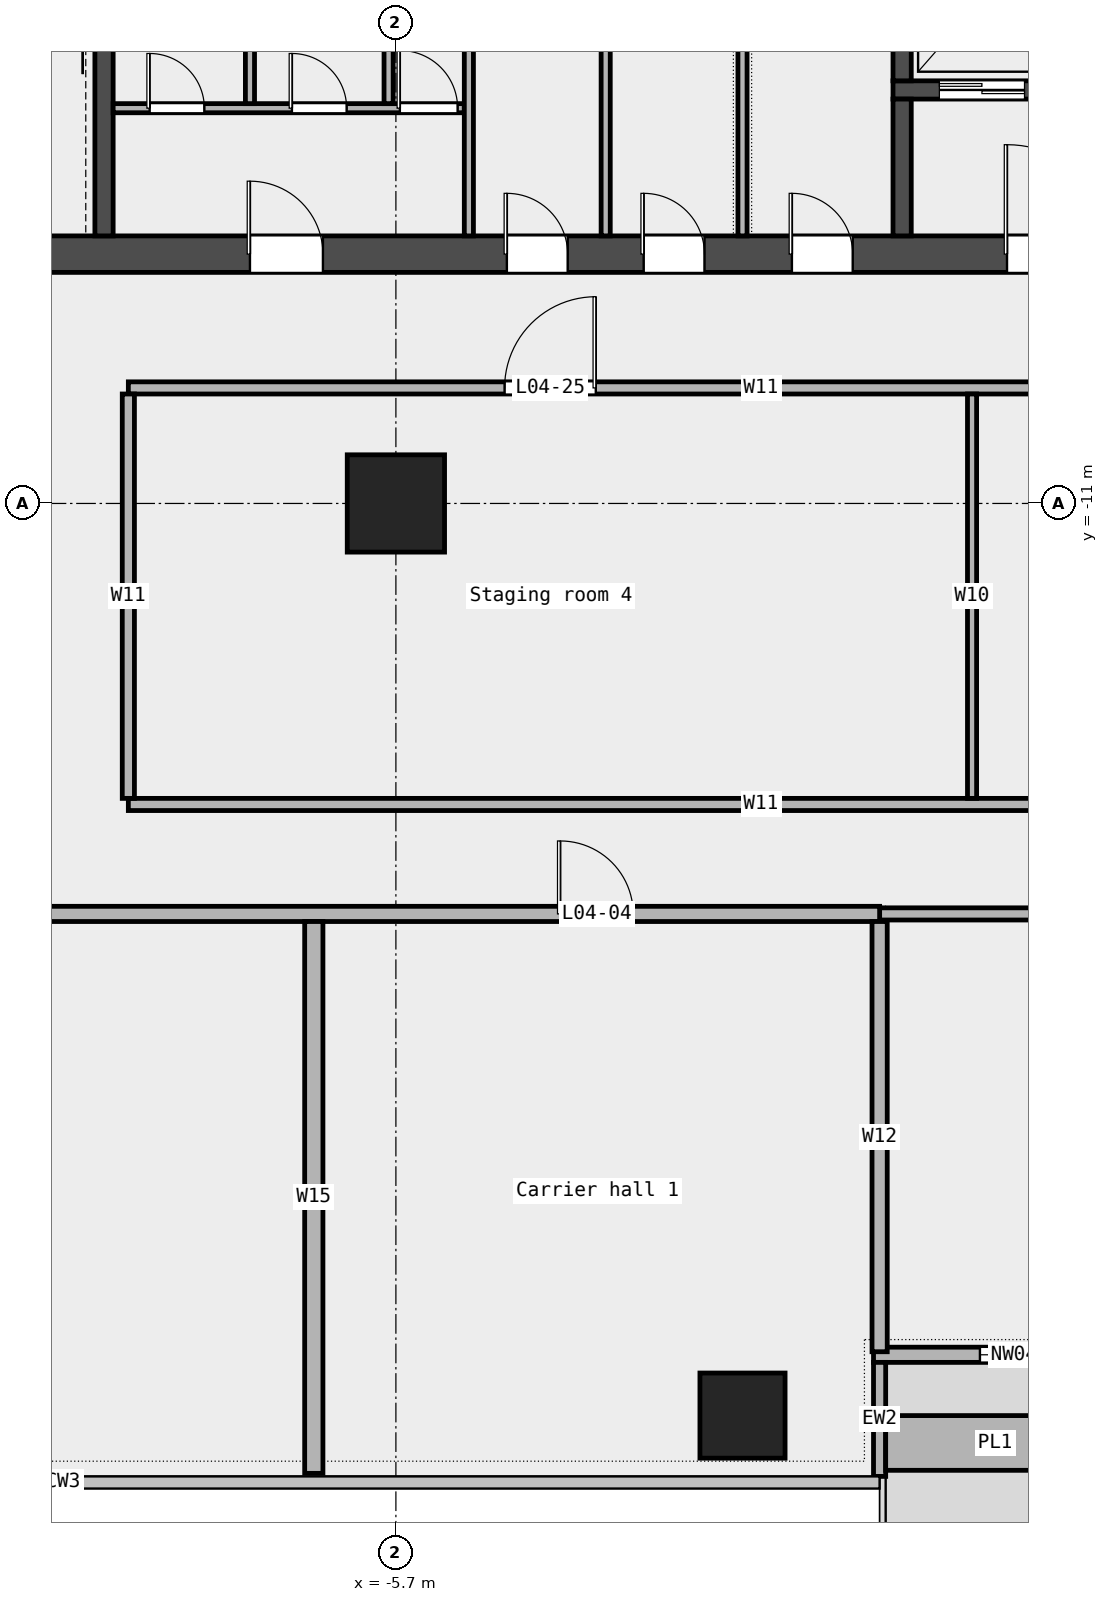
"""IFC4 building model, lengths in metres.
Left out: names, types, materials, properties, quantities, classifications, styles, units other than length and angle.
Written with IfcOpenShell. Run it as: python <this file> out.ifc"""

import sys

from ifc_helpers import new_model, si_unit, direction, frame, frame_2d, origin, origin_2d, place, context, subcontext, project, spatial, rectangle, extrude, element, fill, save


model = new_model("IFC4")
c1 = context("Model", 3, precision=1e-05, world=origin(), true_north=direction((0.0, 1.0)))
c2 = subcontext(c1, "Body", "Model", "MODEL_VIEW")
j1 = project(units=[si_unit("LENGTHUNIT", "METRE"), si_unit("PLANEANGLEUNIT", "RADIAN")], contexts=[c1])
p1 = place(None, origin())
s1 = spatial("IfcSite", under=j1, at=p1, CompositionType="ELEMENT")
p2 = place(p1, origin())
s2 = spatial("IfcBuilding", under=s1, at=p2, CompositionType="ELEMENT")
p3 = place(p2, frame((0.0, 0.0, 25.5)))
s3 = spatial("IfcBuildingStorey", under=s2, at=p3, CompositionType="ELEMENT", Elevation=25.5)
p4 = place(p3, frame((0.0, -26.0, 0.0), z_axis=(0.0, 0.0, 1.0), x_axis=(1.0, 0.0, 0.0)))
e1 = element("IfcColumn", 1, at=p4, inside=s3, PredefinedType="COLUMN", context=c2, shape_type="SweptSolid", body=[
    extrude(rectangle(XDim=1.4, YDim=1.4, at=origin_2d()), origin(), (0.0, 0.0, 1.0), 5.05),
])
p5 = place(p3, frame((-5.7, -11.0, 0.0), z_axis=(0.0, 0.0, 1.0), x_axis=(1.0, 0.0, 0.0)))
e2 = element("IfcColumn", 2, at=p5, inside=s3, PredefinedType="COLUMN", context=c2, shape_type="SweptSolid", body=[
    extrude(rectangle(XDim=1.6, YDim=1.6, at=origin_2d()), origin(), (0.0, 0.0, 1.0), 5.05),
])
p6 = place(p3, frame((2.155, -25.0, 0.0), z_axis=(0.0, 0.0, 1.0), x_axis=(1.0, 0.0, 0.0)))
e3 = element("IfcWall", 3, at=p6, inside=s3, PredefinedType="STANDARD", context=c2, shape_type="SweptSolid", body=[
    extrude(rectangle(XDim=13.727, YDim=0.25, at=frame_2d((6.864, 0.0))), origin(), (0.0, 0.0, 1.0), 5.05),
])
p7 = place(p6, frame((1.75, 0.0, 0.45)))
e4 = element("IfcOpeningElement", 4, at=p7, cuts=e3, PredefinedType="OPENING", context=c2, shape_type="SweptSolid", body=[
    extrude(rectangle(XDim=1.5, YDim=3.0, at=frame_2d((0.75, 1.5))), frame((0.0, 0.137, 0.0), z_axis=(0.0, -1.0, 0.0), x_axis=(1.0, 0.0, 0.0)), (0.0, 0.0, 1.0), 0.274),
])
p8 = place(p6, frame((6.0, 0.0, 0.0)))
e5 = element("IfcOpeningElement", 5, at=p8, cuts=e3, PredefinedType="OPENING", context=c2, shape_type="SweptSolid", body=[
    extrude(rectangle(XDim=1.8, YDim=2.4, at=frame_2d((0.9, 1.2))), frame((0.0, 0.137, 0.0), z_axis=(0.0, -1.0, 0.0), x_axis=(1.0, 0.0, 0.0)), (0.0, 0.0, 1.0), 0.274),
])
p9 = place(p6, frame((11.25, 0.0, 0.45)))
e6 = element("IfcOpeningElement", 6, at=p9, cuts=e3, PredefinedType="OPENING", context=c2, shape_type="SweptSolid", body=[
    extrude(rectangle(XDim=1.5, YDim=3.0, at=frame_2d((0.75, 1.5))), frame((0.0, 0.137, 0.0), z_axis=(0.0, -1.0, 0.0), x_axis=(1.0, 0.0, 0.0)), (0.0, 0.0, 1.0), 0.274),
])
p10 = place(p3, frame((2.255, -27.0, 0.0), z_axis=(0.0, 0.0, 1.0), x_axis=(0.0, 1.0, 0.0)))
e7 = element("IfcWall", 7, at=p10, inside=s3, PredefinedType="STANDARD", context=c2, shape_type="SweptSolid", body=[
    extrude(rectangle(XDim=1.875, YDim=0.2, at=frame_2d((0.938, 0.0))), origin(), (0.0, 0.0, 1.0), 5.05),
])
p11 = place(p3, frame((2.354, -26.45, 0.0), z_axis=(0.0, 0.0, 1.0), x_axis=(1.0, 0.0, 0.0)))
e8 = element("IfcWall", 8, at=p11, inside=s3, PredefinedType="STANDARD", context=c2, shape_type="SweptSolid", body=[
    extrude(rectangle(XDim=3.6, YDim=0.9, at=frame_2d((1.8, 0.0))), origin(), (0.0, 0.0, 1.0), 0.7),
])
p12 = place(p3, frame((2.255, -17.75, 0.0), z_axis=(0.0, 0.0, 1.0), x_axis=(1.0, 0.0, 0.0)))
e9 = element("IfcWall", 9, at=p12, inside=s3, PredefinedType="PARTITIONING", context=c2, shape_type="SweptSolid", body=[
    extrude(rectangle(XDim=13.525, YDim=0.2, at=frame_2d((6.763, 0.0))), origin(), (0.0, 0.0, 1.0), 5.05),
])
p13 = place(p12, frame((6.012, 0.0, 0.0)))
e10 = element("IfcOpeningElement", 10, at=p13, cuts=e9, PredefinedType="OPENING", context=c2, shape_type="SweptSolid", body=[
    extrude(rectangle(XDim=1.5, YDim=2.1, at=frame_2d((0.75, 1.05))), frame((0.0, 0.112, 0.0), z_axis=(0.0, -1.0, 0.0), x_axis=(1.0, 0.0, 0.0)), (0.0, 0.0, 1.0), 0.224),
])
p14 = place(p3, frame((-30.75, -17.75, 0.0), z_axis=(0.0, 0.0, 1.0), x_axis=(1.0, 0.0, 0.0)))
e11 = element("IfcWall", 11, at=p14, inside=s3, PredefinedType="PARTITIONING", context=c2, shape_type="SweptSolid", body=[
    extrude(rectangle(XDim=33.005, YDim=0.25, at=frame_2d((16.502, 0.0))), origin(), (0.0, 0.0, 1.0), 5.05),
])
p15 = place(p14, frame((27.752, 0.0, 0.0)))
e12 = element("IfcOpeningElement", 12, at=p15, cuts=e11, PredefinedType="OPENING", context=c2, shape_type="SweptSolid", body=[
    extrude(rectangle(XDim=1.2, YDim=2.1, at=frame_2d((0.6, 1.05))), frame((0.0, 0.137, 0.0), z_axis=(0.0, -1.0, 0.0), x_axis=(1.0, 0.0, 0.0)), (0.0, 0.0, 1.0), 0.274),
])
p16 = place(p14, frame((11.05, 0.0, 0.0)))
e13 = element("IfcOpeningElement", 13, at=p16, cuts=e11, PredefinedType="OPENING", context=c2, shape_type="SweptSolid", body=[
    extrude(rectangle(XDim=1.8, YDim=2.1, at=frame_2d((0.9, 1.05))), frame((0.0, 0.137, 0.0), z_axis=(0.0, -1.0, 0.0), x_axis=(1.0, 0.0, 0.0)), (0.0, 0.0, 1.0), 0.274),
])
p17 = place(p3, frame((-10.1, -15.95, 0.0), z_axis=(0.0, 0.0, 1.0), x_axis=(1.0, 0.0, 0.0)))
e14 = element("IfcWall", 14, at=p17, inside=s3, PredefinedType="PARTITIONING", context=c2, shape_type="SweptSolid", body=[
    extrude(rectangle(XDim=20.81, YDim=0.2, at=frame_2d((10.405, 0.0))), origin(), (0.0, 0.0, 1.0), 5.05),
])
p18 = place(p3, frame((-10.1, -9.1, 0.0), z_axis=(0.0, 0.0, 1.0), x_axis=(1.0, 0.0, 0.0)))
e15 = element("IfcWall", 15, at=p18, inside=s3, PredefinedType="PARTITIONING", context=c2, shape_type="SweptSolid", body=[
    extrude(rectangle(XDim=20.81, YDim=0.2, at=frame_2d((10.405, 0.0))), origin(), (0.0, 0.0, 1.0), 5.05),
])
p19 = place(p18, frame((16.742, 0.0, 0.0)))
e16 = element("IfcOpeningElement", 16, at=p19, cuts=e15, PredefinedType="OPENING", context=c2, shape_type="SweptSolid", body=[
    extrude(rectangle(XDim=1.2, YDim=2.1, at=frame_2d((0.6, 1.05))), frame((0.0, 0.112, 0.0), z_axis=(0.0, -1.0, 0.0), x_axis=(1.0, 0.0, 0.0)), (0.0, 0.0, 1.0), 0.224),
])
p20 = place(p18, frame((6.188, 0.0, 0.0)))
e17 = element("IfcOpeningElement", 17, at=p20, cuts=e15, PredefinedType="OPENING", context=c2, shape_type="SweptSolid", body=[
    extrude(rectangle(XDim=1.5, YDim=2.1, at=frame_2d((0.75, 1.05))), frame((0.0, 0.112, 0.0), z_axis=(0.0, -1.0, 0.0), x_axis=(1.0, 0.0, 0.0)), (0.0, 0.0, 1.0), 0.224),
])
p21 = place(p3, frame((-10.1, -15.85, 0.0), z_axis=(0.0, 0.0, 1.0), x_axis=(0.0, 1.0, 0.0)))
e18 = element("IfcWall", 18, at=p21, inside=s3, PredefinedType="PARTITIONING", context=c2, shape_type="SweptSolid", body=[
    extrude(rectangle(XDim=6.65, YDim=0.2, at=frame_2d((3.325, 0.0))), origin(), (0.0, 0.0, 1.0), 5.05),
])
p22 = place(p3, frame((-7.05, -26.95, 0.0), z_axis=(0.0, 0.0, 1.0), x_axis=(0.0, 1.0, 0.0)))
e19 = element("IfcWall", 19, at=p22, inside=s3, PredefinedType="PARTITIONING", context=c2, shape_type="SweptSolid", body=[
    extrude(rectangle(XDim=9.075, YDim=0.3, at=frame_2d((4.538, 0.0))), origin(), (0.0, 0.0, 1.0), 5.05),
])
p23 = place(p3, frame((2.255, -24.95, 0.0), z_axis=(0.0, 0.0, 1.0), x_axis=(0.0, 1.0, 0.0)))
e20 = element("IfcWall", 20, at=p23, inside=s3, PredefinedType="PARTITIONING", context=c2, shape_type="SweptSolid", body=[
    extrude(rectangle(XDim=7.075, YDim=0.25, at=frame_2d((3.538, 0.0))), origin(), (0.0, 0.0, 1.0), 5.05),
])
p24 = place(p3, frame((3.775, -15.85, 0.0), z_axis=(0.0, 0.0, 1.0), x_axis=(0.0, 1.0, 0.0)))
e21 = element("IfcWall", 21, at=p24, inside=s3, PredefinedType="PARTITIONING", context=c2, shape_type="SweptSolid", body=[
    extrude(rectangle(XDim=6.65, YDim=0.15, at=frame_2d((3.325, 0.0))), origin(), (0.0, 0.0, 1.0), 5.05),
])
p25 = place(p3, frame((-14.4, -6.9, 0.0), z_axis=(0.0, 0.0, 1.0), x_axis=(1.0, 0.0, 0.0)))
e22 = element("IfcWall", 22, at=p25, inside=s3, PredefinedType="SHEAR", context=c2, shape_type="SweptSolid", body=[
    extrude(rectangle(XDim=28.8, YDim=0.6, at=frame_2d((14.4, 0.0))), origin(), (0.0, 0.0, 1.0), 5.2),
])
p26 = place(p25, frame((6.3, 0.0, 0.0)))
e23 = element("IfcOpeningElement", 23, at=p26, cuts=e22, PredefinedType="OPENING", context=c2, shape_type="SweptSolid", body=[
    extrude(rectangle(XDim=1.2, YDim=2.1, at=frame_2d((0.6, 1.05))), frame((0.0, 0.312, 0.0), z_axis=(0.0, -1.0, 0.0), x_axis=(1.0, 0.0, 0.0)), (0.0, 0.0, 1.0), 0.624),
])
p27 = place(p25, frame((10.525, 0.0, 0.0)))
e24 = element("IfcOpeningElement", 24, at=p27, cuts=e22, PredefinedType="OPENING", context=c2, shape_type="SweptSolid", body=[
    extrude(rectangle(XDim=1.0, YDim=2.1, at=frame_2d((0.5, 1.05))), frame((0.0, 0.312, 0.0), z_axis=(0.0, -1.0, 0.0), x_axis=(1.0, 0.0, 0.0)), (0.0, 0.0, 1.0), 0.624),
])
p28 = place(p25, frame((12.775, 0.0, 0.0)))
e25 = element("IfcOpeningElement", 25, at=p28, cuts=e22, PredefinedType="OPENING", context=c2, shape_type="SweptSolid", body=[
    extrude(rectangle(XDim=1.0, YDim=2.1, at=frame_2d((0.5, 1.05))), frame((0.0, 0.312, 0.0), z_axis=(0.0, -1.0, 0.0), x_axis=(1.0, 0.0, 0.0)), (0.0, 0.0, 1.0), 0.624),
])
p29 = place(p25, frame((15.212, 0.0, 0.0)))
e26 = element("IfcOpeningElement", 26, at=p29, cuts=e22, PredefinedType="OPENING", context=c2, shape_type="SweptSolid", body=[
    extrude(rectangle(XDim=1.0, YDim=2.1, at=frame_2d((0.5, 1.05))), frame((0.0, 0.312, 0.0), z_axis=(0.0, -1.0, 0.0), x_axis=(1.0, 0.0, 0.0)), (0.0, 0.0, 1.0), 0.624),
])
p30 = place(p25, frame((18.75, 0.0, 0.0)))
e27 = element("IfcOpeningElement", 27, at=p30, cuts=e22, PredefinedType="OPENING", context=c2, shape_type="SweptSolid", body=[
    extrude(rectangle(XDim=1.8, YDim=2.1, at=frame_2d((0.9, 1.05))), frame((0.0, 0.312, 0.0), z_axis=(0.0, -1.0, 0.0), x_axis=(1.0, 0.0, 0.0)), (0.0, 0.0, 1.0), 0.624),
])
p31 = place(p25, frame((23.087, 0.0, 0.0)))
e28 = element("IfcOpeningElement", 28, at=p31, cuts=e22, PredefinedType="OPENING", context=c2, shape_type="SweptSolid", body=[
    extrude(rectangle(XDim=1.0, YDim=2.1, at=frame_2d((0.5, 1.05))), frame((0.0, 0.312, 0.0), z_axis=(0.0, -1.0, 0.0), x_axis=(1.0, 0.0, 0.0)), (0.0, 0.0, 1.0), 0.624),
])
p32 = place(p3, frame((-10.5, -6.6, 0.0), z_axis=(0.0, 0.0, 1.0), x_axis=(0.0, 1.0, 0.0)))
e29 = element("IfcWall", 29, at=p32, inside=s3, PredefinedType="SHEAR", context=c2, shape_type="SweptSolid", body=[
    extrude(rectangle(XDim=8.55, YDim=0.3, at=frame_2d((4.275, 0.0))), origin(), (0.0, 0.0, 1.0), 5.2),
])
p33 = place(p3, frame((2.475, -4.2, 0.0), z_axis=(0.0, 0.0, 1.0), x_axis=(1.0, 0.0, 0.0)))
e30 = element("IfcWall", 30, at=p33, inside=s3, PredefinedType="SOLIDWALL", context=c2, shape_type="SweptSolid", body=[
    extrude(rectangle(XDim=5.55, YDim=0.3, at=frame_2d((2.775, 0.0))), origin(), (0.0, 0.0, 1.0), 5.2),
])
p34 = place(p33, frame((0.762, 0.0, 0.0)))
e31 = element("IfcOpeningElement", 31, at=p34, cuts=e30, PredefinedType="OPENING", context=c2, shape_type="SweptSolid", body=[
    extrude(rectangle(XDim=1.4, YDim=2.1, at=frame_2d((0.7, 1.05))), frame((0.0, 0.162, 0.0), z_axis=(0.0, -1.0, 0.0), x_axis=(1.0, 0.0, 0.0)), (0.0, 0.0, 1.0), 0.324),
])
p35 = place(p33, frame((3.387, 0.0, 0.0)))
e32 = element("IfcOpeningElement", 32, at=p35, cuts=e30, PredefinedType="OPENING", context=c2, shape_type="SweptSolid", body=[
    extrude(rectangle(XDim=1.4, YDim=2.1, at=frame_2d((0.7, 1.05))), frame((0.0, 0.162, 0.0), z_axis=(0.0, -1.0, 0.0), x_axis=(1.0, 0.0, 0.0)), (0.0, 0.0, 1.0), 0.324),
])
p36 = place(p3, frame((2.625, -4.05, 0.0), z_axis=(0.0, 0.0, 1.0), x_axis=(0.0, 1.0, 0.0)))
e33 = element("IfcWall", 33, at=p36, inside=s3, PredefinedType="SOLIDWALL", context=c2, shape_type="SweptSolid", body=[
    extrude(rectangle(XDim=2.7, YDim=0.3, at=frame_2d((1.35, 0.0))), origin(), (0.0, 0.0, 1.0), 5.2),
])
p37 = place(p3, frame((2.625, -6.6, 0.0), z_axis=(0.0, 0.0, 1.0), x_axis=(0.0, 1.0, 0.0)))
e34 = element("IfcWall", 34, at=p37, inside=s3, PredefinedType="SOLIDWALL", context=c2, shape_type="SweptSolid", body=[
    extrude(rectangle(XDim=2.25, YDim=0.3, at=frame_2d((1.125, 0.0))), origin(), (0.0, 0.0, 1.0), 5.2),
])
p38 = place(p3, frame((-10.35, -4.5, 0.0), z_axis=(0.0, 0.0, 1.0), x_axis=(1.0, 0.0, 0.0)))
e35 = element("IfcWall", 35, at=p38, inside=s3, PredefinedType="PARTITIONING", context=c2, shape_type="SweptSolid", body=[
    extrude(rectangle(XDim=5.775, YDim=0.15, at=frame_2d((2.888, 0.0))), origin(), (0.0, 0.0, 1.0), 5.2),
])
p39 = place(p38, frame((0.6, 0.0, 0.0)))
e36 = element("IfcOpeningElement", 36, at=p39, cuts=e35, PredefinedType="OPENING", context=c2, shape_type="SweptSolid", body=[
    extrude(rectangle(XDim=0.9, YDim=2.1, at=frame_2d((0.45, 1.05))), frame((0.0, 0.087, 0.0), z_axis=(0.0, -1.0, 0.0), x_axis=(1.0, 0.0, 0.0)), (0.0, 0.0, 1.0), 0.174),
])
p40 = place(p38, frame((2.94, 0.0, 0.0)))
e37 = element("IfcOpeningElement", 37, at=p40, cuts=e35, PredefinedType="OPENING", context=c2, shape_type="SweptSolid", body=[
    extrude(rectangle(XDim=0.9, YDim=2.1, at=frame_2d((0.45, 1.05))), frame((0.0, 0.087, 0.0), z_axis=(0.0, -1.0, 0.0), x_axis=(1.0, 0.0, 0.0)), (0.0, 0.0, 1.0), 0.174),
])
p41 = place(p38, frame((4.715, 0.0, 0.0)))
e38 = element("IfcOpeningElement", 38, at=p41, cuts=e35, PredefinedType="OPENING", context=c2, shape_type="SweptSolid", body=[
    extrude(rectangle(XDim=0.95, YDim=2.1, at=frame_2d((0.475, 1.05))), frame((0.0, 0.087, 0.0), z_axis=(0.0, -1.0, 0.0), x_axis=(1.0, 0.0, 0.0)), (0.0, 0.0, 1.0), 0.174),
])
for number, where, z_axis, x_axis in (
    (39, (-8.1, -4.425, 0.0), (0.0, 0.0, 1.0), (0.0, 1.0, 0.0)),
    (40, (-5.82, -4.425, 0.0), (0.0, 0.0, 1.0), (0.0, 1.0, 0.0)),
):
    element("IfcWall", number, at=place(p3, frame(where, z_axis=z_axis, x_axis=x_axis)), inside=s3, PredefinedType="PARTITIONING", context=c2, shape_type="SweptSolid", body=[
        extrude(rectangle(XDim=3.075, YDim=0.15, at=frame_2d((1.538, 0.0))), origin(), (0.0, 0.0, 1.0), 5.2),
    ])
for number, where, z_axis, x_axis in (
    (41, (-4.5, -6.6, 0.0), (0.0, 0.0, 1.0), (0.0, 1.0, 0.0)),
    (42, (-2.25, -6.6, 0.0), (0.0, 0.0, 1.0), (0.0, 1.0, 0.0)),
    (43, (0.0, -6.6, 0.0), (0.0, 0.0, 1.0), (0.0, 1.0, 0.0)),
):
    element("IfcWall", number, at=place(p3, frame(where, z_axis=z_axis, x_axis=x_axis)), inside=s3, PredefinedType="PARTITIONING", context=c2, shape_type="SweptSolid", body=[
        extrude(rectangle(XDim=5.25, YDim=0.15, at=frame_2d((2.625, 0.0))), origin(), (0.0, 0.0, 1.0), 5.2),
    ])
p42 = place(p7, origin())
e44 = element("IfcWindow", 44, at=p42, inside=s3, PartitioningType="SINGLE_PANEL", PredefinedType="WINDOW", context=c2, shape_type="SweptSolid", body=[
    extrude(rectangle(XDim=1.5, YDim=3.0, at=frame_2d((0.75, 1.5))), frame((0.0, 0.03, 0.0), z_axis=(0.0, -1.0, 0.0), x_axis=(1.0, 0.0, 0.0)), (0.0, 0.0, 1.0), 0.06),
])
fill(e4, e44)
p43 = place(p15, origin())
e45 = element("IfcDoor", 45, at=p43, inside=s3, OperationType="SINGLE_SWING_LEFT", PredefinedType="DOOR", context=c2, shape_type="SweptSolid", body=[
    extrude(rectangle(XDim=1.2, YDim=2.1, at=frame_2d((0.6, 1.05))), frame((0.0, 0.025, 0.0), z_axis=(0.0, -1.0, 0.0), x_axis=(1.0, 0.0, 0.0)), (0.0, 0.0, 1.0), 0.05),
])
fill(e12, e45)
p44 = place(p20, origin())
e46 = element("IfcDoor", 46, at=p44, inside=s3, OperationType="DOUBLE_DOOR_SINGLE_SWING", PredefinedType="DOOR", context=c2, shape_type="SweptSolid", body=[
    extrude(rectangle(XDim=1.5, YDim=2.1, at=frame_2d((0.75, 1.05))), frame((0.0, 0.025, 0.0), z_axis=(0.0, -1.0, 0.0), x_axis=(1.0, 0.0, 0.0)), (0.0, 0.0, 1.0), 0.05),
])
fill(e17, e46)
p45 = place(p34, origin())
e47 = element("IfcDoor", 47, at=p45, inside=s3, OperationType="DOUBLE_DOOR_SLIDING", PredefinedType="DOOR", context=c2, shape_type="SweptSolid", body=[
    extrude(rectangle(XDim=1.4, YDim=2.1, at=frame_2d((0.7, 1.05))), frame((0.0, 0.025, 0.0), z_axis=(0.0, -1.0, 0.0), x_axis=(1.0, 0.0, 0.0)), (0.0, 0.0, 1.0), 0.05),
])
fill(e31, e47)
p46 = place(p26, origin())
e48 = element("IfcDoor", 48, at=p46, inside=s3, OperationType="SINGLE_SWING_LEFT", PredefinedType="DOOR", context=c2, shape_type="SweptSolid", body=[
    extrude(rectangle(XDim=1.2, YDim=2.1, at=frame_2d((0.6, 1.05))), frame((0.0, 0.025, 0.0), z_axis=(0.0, -1.0, 0.0), x_axis=(1.0, 0.0, 0.0)), (0.0, 0.0, 1.0), 0.05),
])
fill(e23, e48)
p47 = place(p39, origin())
e49 = element("IfcDoor", 49, at=p47, inside=s3, OperationType="SINGLE_SWING_LEFT", PredefinedType="DOOR", context=c2, shape_type="SweptSolid", body=[
    extrude(rectangle(XDim=0.9, YDim=2.1, at=frame_2d((0.45, 1.05))), frame((0.0, 0.025, 0.0), z_axis=(0.0, -1.0, 0.0), x_axis=(1.0, 0.0, 0.0)), (0.0, 0.0, 1.0), 0.05),
])
fill(e36, e49)
p48 = place(p40, origin())
e50 = element("IfcDoor", 50, at=p48, inside=s3, OperationType="SINGLE_SWING_LEFT", PredefinedType="DOOR", context=c2, shape_type="SweptSolid", body=[
    extrude(rectangle(XDim=0.9, YDim=2.1, at=frame_2d((0.45, 1.05))), frame((0.0, 0.025, 0.0), z_axis=(0.0, -1.0, 0.0), x_axis=(1.0, 0.0, 0.0)), (0.0, 0.0, 1.0), 0.05),
])
fill(e37, e50)
p49 = place(p41, origin())
e51 = element("IfcDoor", 51, at=p49, inside=s3, OperationType="SINGLE_SWING_LEFT", PredefinedType="DOOR", context=c2, shape_type="SweptSolid", body=[
    extrude(rectangle(XDim=0.95, YDim=2.1, at=frame_2d((0.475, 1.05))), frame((0.0, 0.025, 0.0), z_axis=(0.0, -1.0, 0.0), x_axis=(1.0, 0.0, 0.0)), (0.0, 0.0, 1.0), 0.05),
])
fill(e38, e51)
p50 = place(p27, origin())
e52 = element("IfcDoor", 52, at=p50, inside=s3, OperationType="SINGLE_SWING_LEFT", PredefinedType="DOOR", context=c2, shape_type="SweptSolid", body=[
    extrude(rectangle(XDim=1.0, YDim=2.1, at=frame_2d((0.5, 1.05))), frame((0.0, 0.025, 0.0), z_axis=(0.0, -1.0, 0.0), x_axis=(1.0, 0.0, 0.0)), (0.0, 0.0, 1.0), 0.05),
])
fill(e24, e52)
p51 = place(p28, origin())
e53 = element("IfcDoor", 53, at=p51, inside=s3, OperationType="SINGLE_SWING_LEFT", PredefinedType="DOOR", context=c2, shape_type="SweptSolid", body=[
    extrude(rectangle(XDim=1.0, YDim=2.1, at=frame_2d((0.5, 1.05))), frame((0.0, 0.025, 0.0), z_axis=(0.0, -1.0, 0.0), x_axis=(1.0, 0.0, 0.0)), (0.0, 0.0, 1.0), 0.05),
])
fill(e25, e53)
p52 = place(p29, origin())
e54 = element("IfcDoor", 54, at=p52, inside=s3, OperationType="SINGLE_SWING_LEFT", PredefinedType="DOOR", context=c2, shape_type="SweptSolid", body=[
    extrude(rectangle(XDim=1.0, YDim=2.1, at=frame_2d((0.5, 1.05))), frame((0.0, 0.025, 0.0), z_axis=(0.0, -1.0, 0.0), x_axis=(1.0, 0.0, 0.0)), (0.0, 0.0, 1.0), 0.05),
])
fill(e26, e54)
p53 = place(p30, origin())
e55 = element("IfcDoor", 55, at=p53, inside=s3, OperationType="DOUBLE_DOOR_SINGLE_SWING", PredefinedType="DOOR", context=c2, shape_type="SweptSolid", body=[
    extrude(rectangle(XDim=1.8, YDim=2.1, at=frame_2d((0.9, 1.05))), frame((0.0, 0.025, 0.0), z_axis=(0.0, -1.0, 0.0), x_axis=(1.0, 0.0, 0.0)), (0.0, 0.0, 1.0), 0.05),
])
fill(e27, e55)
save(model, sys.argv[1])
